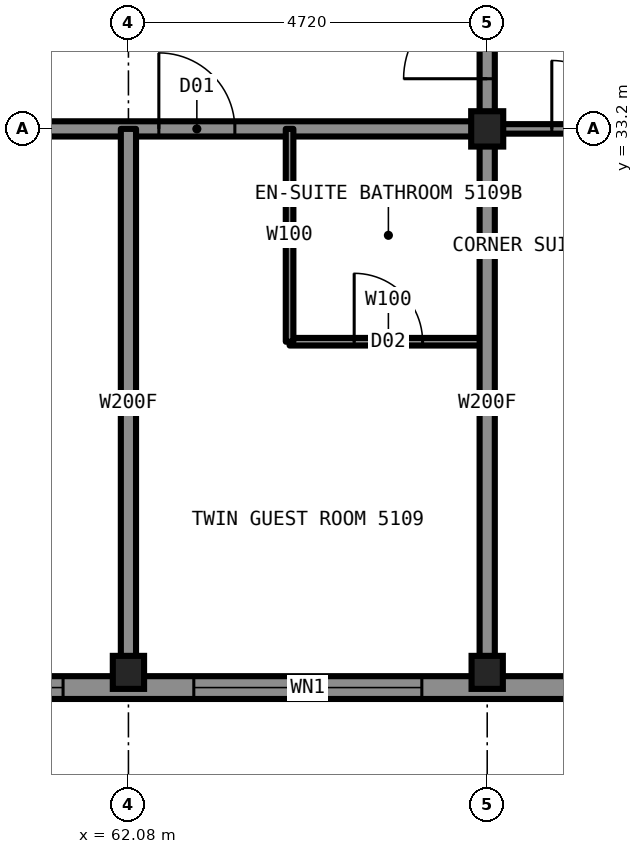
"""IFC4 building model, lengths in metres.
Left out: names, types, materials, properties, quantities, classifications, styles, units other than length and angle.
Written with IfcOpenShell. Run it as: python <this file> out.ifc"""

import sys

from ifc_helpers import new_model, si_unit, direction, frame, frame_2d, origin, origin_2d, place, context, subcontext, project, spatial, rectangle, i_section, extrude, element, fill, save


model = new_model("IFC4")
c1 = context("Model", 3, precision=1e-05, world=origin(), true_north=direction((0.0, 1.0)))
c2 = subcontext(c1, "Body", "Model", "MODEL_VIEW")
j1 = project(units=[si_unit("LENGTHUNIT", "METRE"), si_unit("PLANEANGLEUNIT", "RADIAN")], contexts=[c1])
p1 = place(None, origin())
s1 = spatial("IfcSite", under=j1, at=p1, CompositionType="ELEMENT")
p2 = place(p1, origin())
s2 = spatial("IfcBuilding", under=s1, at=p2, CompositionType="ELEMENT")
p3 = place(p2, frame((0.0, 0.0, 182.8)))
s3 = spatial("IfcBuildingStorey", under=s2, at=p3, CompositionType="ELEMENT", Elevation=182.8)
for number, where, z_axis, x_axis in (
    (1, (62.08, 26.05, 0.0), (0.0, 0.0, 1.0), (1.0, 0.0, 0.0)),
    (2, (66.8, 26.05, 0.0), (0.0, 0.0, 1.0), (1.0, 0.0, 0.0)),
):
    element("IfcColumn", number, at=place(p3, frame(where, z_axis=z_axis, x_axis=x_axis)), inside=s3, PredefinedType="COLUMN", context=c2, shape_type="SweptSolid", body=[
        extrude(i_section(OverallWidth=0.411, OverallDepth=0.434, WebThickness=0.036, FlangeThickness=0.057, at=origin_2d()), origin(), (0.0, 0.0, 1.0), 3.5),
    ])
p4 = place(p3, frame((66.8, 33.2, 0.0), z_axis=(0.0, 0.0, 1.0), x_axis=(1.0, 0.0, 0.0)))
e3 = element("IfcColumn", 3, at=p4, inside=s3, PredefinedType="COLUMN", context=c2, shape_type="SweptSolid", body=[
    extrude(i_section(OverallWidth=0.422, OverallDepth=0.465, WebThickness=0.045, FlangeThickness=0.073, at=origin_2d()), origin(), (0.0, 0.0, 1.0), 3.5),
])
p5 = place(p3, frame((43.2, 33.2, 0.0), z_axis=(0.0, 0.0, 1.0), x_axis=(1.0, 0.0, 0.0)))
e4 = element("IfcWall", 4, at=p5, inside=s3, PredefinedType="PARTITIONING", context=c2, shape_type="SweptSolid", body=[
    extrude(rectangle(XDim=23.6, YDim=0.2, at=frame_2d((11.8, 0.0))), origin(), (0.0, 0.0, 1.0), 3.33),
])
p6 = place(p5, frame((3.0, 0.0, 0.0)))
e5 = element("IfcOpeningElement", 5, at=p6, cuts=e4, PredefinedType="OPENING", context=c2, shape_type="SweptSolid", body=[
    extrude(rectangle(XDim=1.0, YDim=2.2, at=frame_2d((0.5, 1.1))), frame((0.0, 0.11, 0.0), z_axis=(0.0, -1.0, 0.0), x_axis=(1.0, 0.0, 0.0)), (0.0, 0.0, 1.0), 0.22),
])
p7 = place(p5, frame((11.99, 0.0, 0.0)))
e6 = element("IfcOpeningElement", 6, at=p7, cuts=e4, PredefinedType="OPENING", context=c2, shape_type="SweptSolid", body=[
    extrude(rectangle(XDim=1.0, YDim=2.2, at=frame_2d((0.5, 1.1))), frame((0.0, 0.11, 0.0), z_axis=(0.0, -1.0, 0.0), x_axis=(1.0, 0.0, 0.0)), (0.0, 0.0, 1.0), 0.22),
])
p8 = place(p5, frame((16.71, 0.0, 0.0)))
e7 = element("IfcOpeningElement", 7, at=p8, cuts=e4, PredefinedType="OPENING", context=c2, shape_type="SweptSolid", body=[
    extrude(rectangle(XDim=1.0, YDim=2.2, at=frame_2d((0.5, 1.1))), frame((0.0, 0.11, 0.0), z_axis=(0.0, -1.0, 0.0), x_axis=(1.0, 0.0, 0.0)), (0.0, 0.0, 1.0), 0.22),
])
p9 = place(p5, frame((19.28, 0.0, 0.0)))
e8 = element("IfcOpeningElement", 8, at=p9, cuts=e4, PredefinedType="OPENING", context=c2, shape_type="SweptSolid", body=[
    extrude(rectangle(XDim=1.0, YDim=2.2, at=frame_2d((0.5, 1.1))), frame((0.0, 0.11, 0.0), z_axis=(0.0, -1.0, 0.0), x_axis=(1.0, 0.0, 0.0)), (0.0, 0.0, 1.0), 0.22),
])
p10 = place(p3, frame((66.8, 33.2, 0.0), z_axis=(0.0, 0.0, 1.0), x_axis=(1.0, 0.0, 0.0)))
e9 = element("IfcWall", 9, at=p10, inside=s3, PredefinedType="PARTITIONING", context=c2, shape_type="SweptSolid", body=[
    extrude(rectangle(XDim=7.2, YDim=0.125, at=frame_2d((3.6, 0.0))), origin(), (0.0, 0.0, 1.0), 2.573),
])
p11 = place(p10, frame((0.85, 0.0, 0.0)))
e10 = element("IfcOpeningElement", 10, at=p11, cuts=e9, PredefinedType="OPENING", context=c2, shape_type="SweptSolid", body=[
    extrude(rectangle(XDim=0.9, YDim=2.2, at=frame_2d((0.45, 1.1))), frame((0.0, 0.073, 0.0), z_axis=(0.0, -1.0, 0.0), x_axis=(1.0, 0.0, 0.0)), (0.0, 0.0, 1.0), 0.145),
])
p12 = place(p3, frame((64.2, 30.4, 0.0), z_axis=(0.0, 0.0, 1.0), x_axis=(1.0, 0.0, 0.0)))
e11 = element("IfcWall", 11, at=p12, inside=s3, PredefinedType="PARTITIONING", context=c2, shape_type="SweptSolid", body=[
    extrude(rectangle(XDim=2.6, YDim=0.1, at=frame_2d((1.3, 0.0))), origin(), (0.0, 0.0, 1.0), 3.33),
])
p13 = place(p12, frame((0.85, 0.0, 0.0)))
e12 = element("IfcOpeningElement", 12, at=p13, cuts=e11, PredefinedType="OPENING", context=c2, shape_type="SweptSolid", body=[
    extrude(rectangle(XDim=0.9, YDim=2.1, at=frame_2d((0.45, 1.05))), frame((0.0, 0.06, 0.0), z_axis=(0.0, -1.0, 0.0), x_axis=(1.0, 0.0, 0.0)), (0.0, 0.0, 1.0), 0.12),
])
p14 = place(p3, frame((66.8, 33.2, 0.0), z_axis=(0.0, 0.0, 1.0), x_axis=(0.0, 1.0, 0.0)))
e13 = element("IfcWall", 13, at=p14, inside=s3, PredefinedType="PARTITIONING", context=c2, shape_type="SweptSolid", body=[
    extrude(rectangle(XDim=4.72, YDim=0.2, at=frame_2d((2.36, 0.0))), origin(), (0.0, 0.0, 1.0), 3.33),
])
p15 = place(p14, frame((0.66, 0.0, 0.0)))
e14 = element("IfcOpeningElement", 14, at=p15, cuts=e13, PredefinedType="OPENING", context=c2, shape_type="SweptSolid", body=[
    extrude(rectangle(XDim=1.1, YDim=2.2, at=frame_2d((0.55, 1.1))), frame((0.0, 0.11, 0.0), z_axis=(0.0, -1.0, 0.0), x_axis=(1.0, 0.0, 0.0)), (0.0, 0.0, 1.0), 0.22),
])
for number, where, z_axis, x_axis in (
    (15, (66.8, 26.0, 0.0), (0.0, 0.0, 1.0), (0.0, 1.0, 0.0)),
    (16, (62.08, 26.0, 0.0), (0.0, 0.0, 1.0), (0.0, 1.0, 0.0)),
):
    element("IfcWall", number, at=place(p3, frame(where, z_axis=z_axis, x_axis=x_axis)), inside=s3, PredefinedType="PARTITIONING", context=c2, shape_type="SweptSolid", body=[
        extrude(rectangle(XDim=7.2, YDim=0.2, at=frame_2d((3.6, 0.0))), origin(), (0.0, 0.0, 1.0), 2.573),
    ])
p16 = place(p3, frame((64.2, 30.4, 0.0), z_axis=(0.0, 0.0, 1.0), x_axis=(0.0, 1.0, 0.0)))
e17 = element("IfcWall", 17, at=p16, inside=s3, PredefinedType="PARTITIONING", context=c2, shape_type="SweptSolid", body=[
    extrude(rectangle(XDim=2.8, YDim=0.1, at=frame_2d((1.4, 0.0))), origin(), (0.0, 0.0, 1.0), 3.33),
])
p17 = place(p3, frame((41.2, 25.85, 0.0), z_axis=(0.0, 0.0, 1.0), x_axis=(1.0, 0.0, 0.0)))
e18 = element("IfcWall", 18, at=p17, inside=s3, PredefinedType="SOLIDWALL", context=c2, shape_type="SweptSolid", body=[
    extrude(rectangle(XDim=27.6, YDim=0.3, at=frame_2d((13.8, 0.0))), origin(), (0.0, 0.0, 1.0), 2.83),
])
p18 = place(p17, frame((2.86, 0.0, 0.3)))
e19 = element("IfcOpeningElement", 19, at=p18, cuts=e18, PredefinedType="OPENING", context=c2, shape_type="SweptSolid", body=[
    extrude(rectangle(XDim=3.0, YDim=2.0, at=frame_2d((1.5, 1.0))), frame((0.0, 0.16, 0.0), z_axis=(0.0, -1.0, 0.0), x_axis=(1.0, 0.0, 0.0)), (0.0, 0.0, 1.0), 0.32),
])
p19 = place(p17, frame((9.88, 0.0, 0.3)))
e20 = element("IfcOpeningElement", 20, at=p19, cuts=e18, PredefinedType="OPENING", context=c2, shape_type="SweptSolid", body=[
    extrude(rectangle(XDim=0.7, YDim=1.1, at=frame_2d((0.35, 0.55))), frame((0.0, 0.16, 0.0), z_axis=(0.0, -1.0, 0.0), x_axis=(1.0, 0.0, 0.0)), (0.0, 0.0, 1.0), 0.32),
])
p20 = place(p17, frame((12.3, 0.0, 0.3)))
e21 = element("IfcOpeningElement", 21, at=p20, cuts=e18, PredefinedType="OPENING", context=c2, shape_type="SweptSolid", body=[
    extrude(rectangle(XDim=3.0, YDim=2.0, at=frame_2d((1.5, 1.0))), frame((0.0, 0.16, 0.0), z_axis=(0.0, -1.0, 0.0), x_axis=(1.0, 0.0, 0.0)), (0.0, 0.0, 1.0), 0.32),
])
p21 = place(p17, frame((17.02, 0.0, 0.3)))
e22 = element("IfcOpeningElement", 22, at=p21, cuts=e18, PredefinedType="OPENING", context=c2, shape_type="SweptSolid", body=[
    extrude(rectangle(XDim=0.7, YDim=1.1, at=frame_2d((0.35, 0.55))), frame((0.0, 0.16, 0.0), z_axis=(0.0, -1.0, 0.0), x_axis=(1.0, 0.0, 0.0)), (0.0, 0.0, 1.0), 0.32),
])
p22 = place(p17, frame((21.74, 0.0, 0.3)))
e23 = element("IfcOpeningElement", 23, at=p22, cuts=e18, PredefinedType="OPENING", context=c2, shape_type="SweptSolid", body=[
    extrude(rectangle(XDim=3.0, YDim=2.0, at=frame_2d((1.5, 1.0))), frame((0.0, 0.16, 0.0), z_axis=(0.0, -1.0, 0.0), x_axis=(1.0, 0.0, 0.0)), (0.0, 0.0, 1.0), 0.32),
])
p23 = place(p9, origin())
e24 = element("IfcDoor", 24, at=p23, inside=s3, OperationType="SINGLE_SWING_LEFT", PredefinedType="DOOR", context=c2, shape_type="SweptSolid", body=[
    extrude(rectangle(XDim=1.0, YDim=2.2, at=frame_2d((0.5, 1.1))), frame((0.0, 0.025, 0.0), z_axis=(0.0, -1.0, 0.0), x_axis=(1.0, 0.0, 0.0)), (0.0, 0.0, 1.0), 0.05),
])
fill(e8, e24)
p24 = place(p13, origin())
e25 = element("IfcDoor", 25, at=p24, inside=s3, OperationType="SINGLE_SWING_RIGHT", PredefinedType="DOOR", context=c2, shape_type="SweptSolid", body=[
    extrude(rectangle(XDim=0.9, YDim=2.1, at=frame_2d((0.45, 1.05))), frame((0.0, 0.025, 0.0), z_axis=(0.0, -1.0, 0.0), x_axis=(1.0, 0.0, 0.0)), (0.0, 0.0, 1.0), 0.05),
])
fill(e12, e25)
p25 = place(p11, origin())
e26 = element("IfcDoor", 26, at=p25, inside=s3, OperationType="SINGLE_SWING_LEFT", PredefinedType="DOOR", context=c2, shape_type="SweptSolid", body=[
    extrude(rectangle(XDim=0.9, YDim=2.2, at=frame_2d((0.45, 1.1))), frame((0.0, 0.025, 0.0), z_axis=(0.0, -1.0, 0.0), x_axis=(1.0, 0.0, 0.0)), (0.0, 0.0, 1.0), 0.05),
])
fill(e10, e26)
p26 = place(p15, origin())
e27 = element("IfcDoor", 27, at=p26, inside=s3, OperationType="SINGLE_SWING_LEFT", PredefinedType="DOOR", context=c2, shape_type="SweptSolid", body=[
    extrude(rectangle(XDim=1.1, YDim=2.2, at=frame_2d((0.55, 1.1))), frame((0.0, 0.025, 0.0), z_axis=(0.0, -1.0, 0.0), x_axis=(1.0, 0.0, 0.0)), (0.0, 0.0, 1.0), 0.05),
])
fill(e14, e27)
p27 = place(p22, origin())
e28 = element("IfcWindow", 28, at=p27, inside=s3, PartitioningType="SINGLE_PANEL", PredefinedType="WINDOW", context=c2, shape_type="SweptSolid", body=[
    extrude(rectangle(XDim=3.0, YDim=2.0, at=frame_2d((1.5, 1.0))), frame((0.0, 0.13, 0.0), z_axis=(0.0, -1.0, 0.0), x_axis=(1.0, 0.0, 0.0)), (0.0, 0.0, 1.0), 0.06),
])
fill(e23, e28)
save(model, sys.argv[1])
